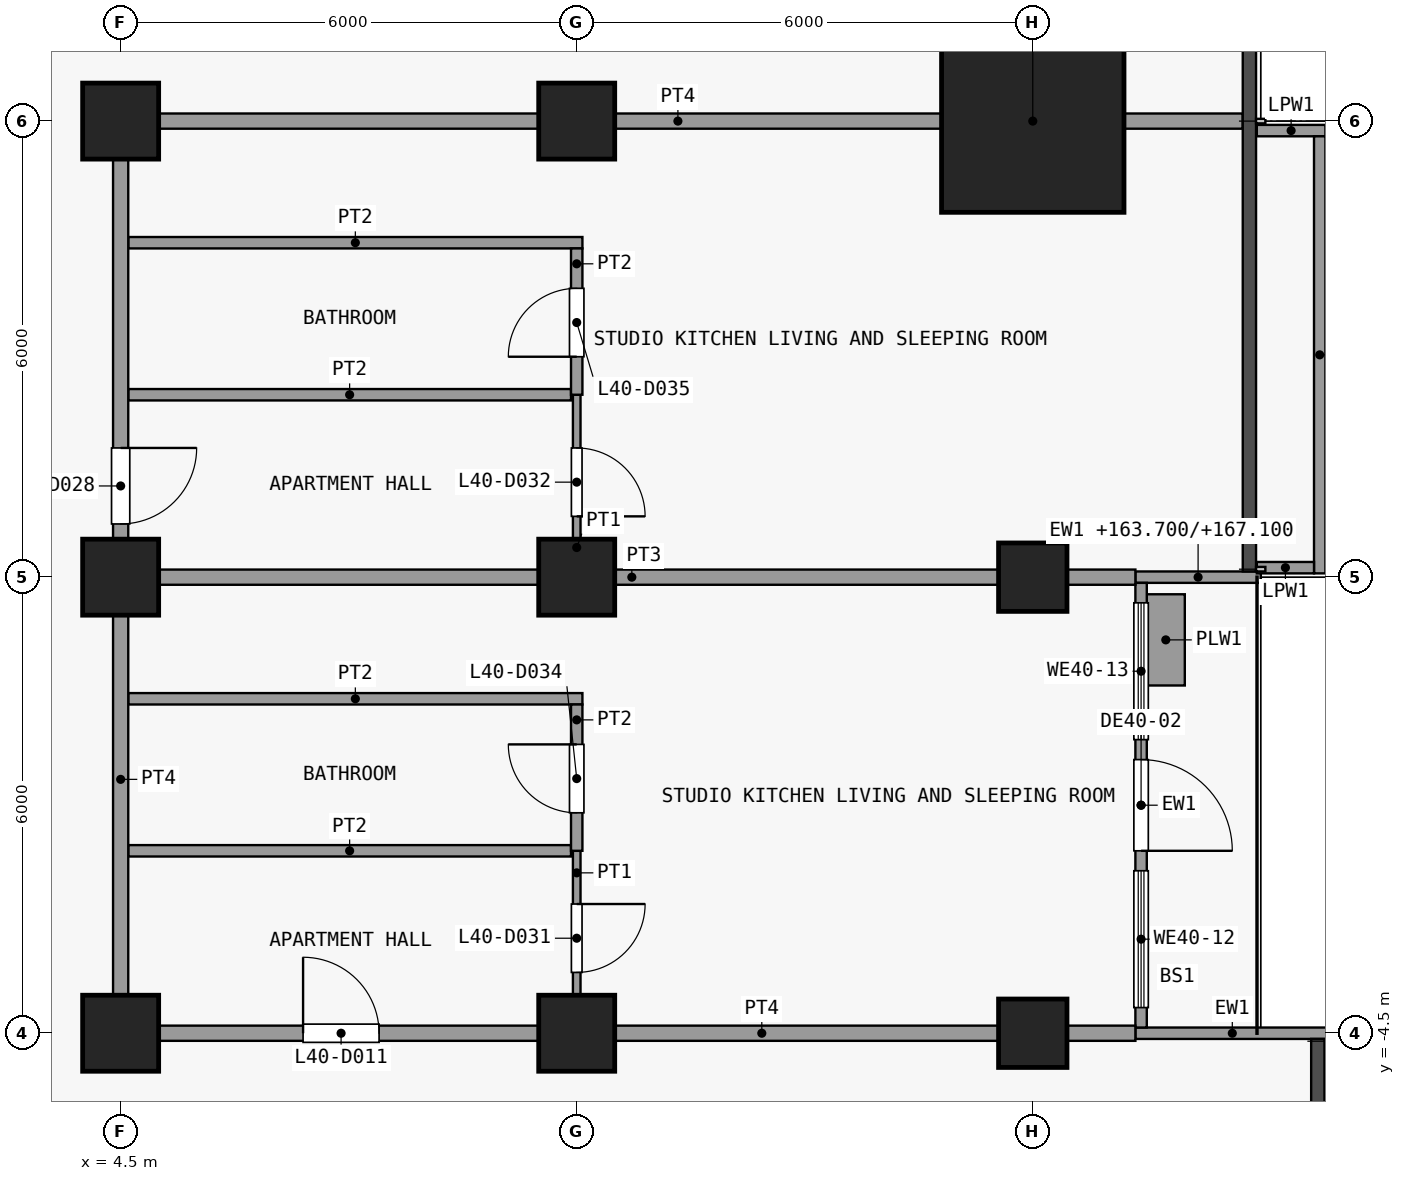
"""IFC4 building model, lengths in metres.
Left out: names, types, materials, properties, quantities, classifications, styles, units other than length and angle.
Written with IfcOpenShell. Run it as: python <this file> out.ifc"""

import sys

from ifc_helpers import new_model, si_unit, direction, frame, frame_2d, origin, origin_2d, place, context, subcontext, project, spatial, rectangle, extrude, element, fill, save


model = new_model("IFC4")
c1 = context("Model", 3, precision=1e-05, world=origin(), true_north=direction((0.0, 1.0)))
c2 = subcontext(c1, "Body", "Model", "MODEL_VIEW")
j1 = project(units=[si_unit("LENGTHUNIT", "METRE"), si_unit("PLANEANGLEUNIT", "RADIAN")], contexts=[c1])
p1 = place(None, origin())
s1 = spatial("IfcSite", under=j1, at=p1, CompositionType="ELEMENT")
p2 = place(p1, origin())
s2 = spatial("IfcBuilding", under=s1, at=p2, CompositionType="ELEMENT")
p3 = place(p2, frame((0.0, 0.0, 163.7)))
s3 = spatial("IfcBuildingStorey", under=s2, at=p3, CompositionType="ELEMENT", Elevation=163.7)
for number, where, z_axis, x_axis in (
    (1, (4.5, -4.5, 0.0), (0.0, 0.0, 1.0), (1.0, 0.0, 0.0)),
    (2, (4.5, 1.5, 0.0), (0.0, 0.0, 1.0), (1.0, 0.0, 0.0)),
    (3, (4.5, 7.5, 0.0), (0.0, 0.0, 1.0), (1.0, 0.0, 0.0)),
    (4, (10.5, -4.5, 0.0), (0.0, 0.0, 1.0), (1.0, 0.0, 0.0)),
    (5, (10.5, 1.5, 0.0), (0.0, 0.0, 1.0), (1.0, 0.0, 0.0)),
    (6, (10.5, 7.5, 0.0), (0.0, 0.0, 1.0), (1.0, 0.0, 0.0)),
):
    element("IfcColumn", number, at=place(p3, frame(where, z_axis=z_axis, x_axis=x_axis)), inside=s3, PredefinedType="COLUMN", context=c2, shape_type="SweptSolid", body=[
        extrude(rectangle(XDim=1.0, YDim=1.0, at=origin_2d()), origin(), (0.0, 0.0, 1.0), 3.6),
    ])
for number, where, z_axis, x_axis in (
    (7, (16.5, -4.5, 0.0), (0.0, 0.0, 1.0), (1.0, 0.0, 0.0)),
    (8, (16.5, 1.5, 0.0), (0.0, 0.0, 1.0), (1.0, 0.0, 0.0)),
):
    element("IfcColumn", number, at=place(p3, frame(where, z_axis=z_axis, x_axis=x_axis)), inside=s3, PredefinedType="COLUMN", context=c2, shape_type="SweptSolid", body=[
        extrude(rectangle(XDim=0.9, YDim=0.9, at=origin_2d()), origin(), (0.0, 0.0, 1.0), 3.6),
    ])
p4 = place(p3, frame((16.5, 7.5, 0.0), z_axis=(0.0, 0.0, 1.0), x_axis=(1.0, 0.0, 0.0)))
e9 = element("IfcColumn", 9, at=p4, inside=s3, PredefinedType="COLUMN", context=c2, shape_type="SweptSolid", body=[
    extrude(rectangle(XDim=2.4, YDim=2.4, at=origin_2d()), origin(), (0.0, 0.0, 1.0), 3.6),
])
p5 = place(p3, frame((17.85, -4.5, 0.0), z_axis=(0.0, 0.0, 1.0), x_axis=(1.0, 0.0, 0.0)))
e10 = element("IfcWall", 10, at=p5, inside=s3, PredefinedType="SOLIDWALL", context=c2, shape_type="SweptSolid", body=[
    extrude(rectangle(XDim=2.55, YDim=0.15, at=frame_2d((1.275, 0.0))), origin(), (0.0, 0.0, 1.0), 3.3),
])
p6 = place(p3, frame((17.85, 1.5, 0.0), z_axis=(0.0, 0.0, 1.0), x_axis=(1.0, 0.0, 0.0)))
e11 = element("IfcWall", 11, at=p6, inside=s3, PredefinedType="SOLIDWALL", context=c2, shape_type="SweptSolid", body=[
    extrude(rectangle(XDim=1.65, YDim=0.15, at=frame_2d((0.825, 0.0))), origin(), (0.0, 0.0, 1.0), 3.4),
])
p7 = place(p3, frame((17.925, 1.425, 0.0), z_axis=(0.0, 0.0, 1.0), x_axis=(0.0, -1.0, 0.0)))
e12 = element("IfcWall", 12, at=p7, inside=s3, PredefinedType="SOLIDWALL", context=c2, shape_type="SweptSolid", body=[
    extrude(rectangle(XDim=5.85, YDim=0.15, at=frame_2d((2.925, 0.0))), origin(), (0.0, 0.0, 1.0), 3.3),
])
p8 = place(p7, frame((2.325, 0.0, 0.0)))
e13 = element("IfcOpeningElement", 13, at=p8, cuts=e12, PredefinedType="OPENING", context=c2, shape_type="SweptSolid", body=[
    extrude(rectangle(XDim=1.2, YDim=2.4, at=frame_2d((0.6, 1.2))), frame((0.0, 0.085, 0.0), z_axis=(0.0, -1.0, 0.0), x_axis=(1.0, 0.0, 0.0)), (0.0, 0.0, 1.0), 0.17),
])
p9 = place(p7, frame((3.788, 0.0, 0.9)))
e14 = element("IfcOpeningElement", 14, at=p9, cuts=e12, PredefinedType="OPENING", context=c2, shape_type="SweptSolid", body=[
    extrude(rectangle(XDim=1.8, YDim=2.1, at=frame_2d((0.9, 1.05))), frame((0.0, 0.085, 0.0), z_axis=(0.0, -1.0, 0.0), x_axis=(1.0, 0.0, 0.0)), (0.0, 0.0, 1.0), 0.17),
])
p10 = place(p7, frame((0.262, 0.0, 0.9)))
e15 = element("IfcOpeningElement", 15, at=p10, cuts=e12, PredefinedType="OPENING", context=c2, shape_type="SweptSolid", body=[
    extrude(rectangle(XDim=1.8, YDim=2.1, at=frame_2d((0.9, 1.05))), frame((0.0, 0.085, 0.0), z_axis=(0.0, -1.0, 0.0), x_axis=(1.0, 0.0, 0.0)), (0.0, 0.0, 1.0), 0.17),
])
p11 = place(p3, frame((18.25, 0.075, 0.0), z_axis=(0.0, 0.0, 1.0), x_axis=(0.0, 1.0, 0.0)))
e16 = element("IfcWall", 16, at=p11, inside=s3, PredefinedType="USERDEFINED", context=c2, shape_type="SweptSolid", body=[
    extrude(rectangle(XDim=1.2, YDim=0.5, at=frame_2d((0.6, 0.0))), origin(), (0.0, 0.0, 1.0), 0.9),
])
p12 = place(p3, frame((19.448, 7.375, 0.0), z_axis=(0.0, 0.0, 1.0), x_axis=(1.0, 0.0, 0.0)))
e17 = element("IfcWall", 17, at=p12, inside=s3, PredefinedType="PARAPET", context=c2, shape_type="SweptSolid", body=[
    extrude(rectangle(XDim=0.903, YDim=0.15, at=frame_2d((0.451, 0.0))), origin(), (0.0, 0.0, 1.0), 1.15),
])
p13 = place(p3, frame((20.275, 7.3, 0.0), z_axis=(0.0, 0.0, 1.0), x_axis=(0.0, -1.0, 0.0)))
e18 = element("IfcWall", 18, at=p13, inside=s3, PredefinedType="PARAPET", context=c2, shape_type="SweptSolid", body=[
    extrude(rectangle(XDim=5.75, YDim=0.15, at=frame_2d((2.875, 0.0))), origin(), (0.0, 0.0, 1.0), 1.15),
])
p14 = place(p3, frame((20.2, 1.625, 0.0), z_axis=(0.0, 0.0, 1.0), x_axis=(-1.0, 0.0, 0.0)))
e19 = element("IfcWall", 19, at=p14, inside=s3, PredefinedType="PARAPET", context=c2, shape_type="SweptSolid", body=[
    extrude(rectangle(XDim=0.752, YDim=0.15, at=frame_2d((0.376, 0.0))), origin(), (0.0, 0.0, 1.0), 1.15),
])
p15 = place(p3, frame((4.4, -4.5, 0.0), z_axis=(0.0, 0.0, 1.0), x_axis=(1.0, 0.0, 0.0)))
e20 = element("IfcWall", 20, at=p15, inside=s3, PredefinedType="PARTITIONING", context=c2, shape_type="SweptSolid", body=[
    extrude(rectangle(XDim=13.45, YDim=0.2, at=frame_2d((6.725, 0.0))), origin(), (0.0, 0.0, 1.0), 3.3),
])
p16 = place(p15, frame((2.5, 0.0, 0.0)))
e21 = element("IfcOpeningElement", 21, at=p16, cuts=e20, PredefinedType="OPENING", context=c2, shape_type="SweptSolid", body=[
    extrude(rectangle(XDim=1.0, YDim=2.1, at=frame_2d((0.5, 1.05))), frame((0.0, 0.11, 0.0), z_axis=(0.0, -1.0, 0.0), x_axis=(1.0, 0.0, 0.0)), (0.0, 0.0, 1.0), 0.22),
])
p17 = place(p3, frame((4.6, -2.1, 0.0), z_axis=(0.0, 0.0, 1.0), x_axis=(1.0, 0.0, 0.0)))
e22 = element("IfcWall", 22, at=p17, inside=s3, PredefinedType="PARTITIONING", context=c2, shape_type="SweptSolid", body=[
    extrude(rectangle(XDim=5.825, YDim=0.15, at=frame_2d((2.913, 0.0))), origin(), (0.0, 0.0, 1.0), 3.3),
])
p18 = place(p3, frame((4.6, -0.1, 0.0), z_axis=(0.0, 0.0, 1.0), x_axis=(1.0, 0.0, 0.0)))
e23 = element("IfcWall", 23, at=p18, inside=s3, PredefinedType="PARTITIONING", context=c2, shape_type="SweptSolid", body=[
    extrude(rectangle(XDim=5.975, YDim=0.15, at=frame_2d((2.987, 0.0))), origin(), (0.0, 0.0, 1.0), 3.3),
])
p19 = place(p3, frame((4.6, 1.5, 0.0), z_axis=(0.0, 0.0, 1.0), x_axis=(1.0, 0.0, 0.0)))
e24 = element("IfcWall", 24, at=p19, inside=s3, PredefinedType="PARTITIONING", context=c2, shape_type="SweptSolid", body=[
    extrude(rectangle(XDim=13.25, YDim=0.2, at=frame_2d((6.625, 0.0))), origin(), (0.0, 0.0, 1.0), 3.3),
])
p20 = place(p3, frame((4.6, 3.9, 0.0), z_axis=(0.0, 0.0, 1.0), x_axis=(1.0, 0.0, 0.0)))
e25 = element("IfcWall", 25, at=p20, inside=s3, PredefinedType="PARTITIONING", context=c2, shape_type="SweptSolid", body=[
    extrude(rectangle(XDim=5.825, YDim=0.15, at=frame_2d((2.913, 0.0))), origin(), (0.0, 0.0, 1.0), 3.3),
])
p21 = place(p3, frame((4.6, 5.9, 0.0), z_axis=(0.0, 0.0, 1.0), x_axis=(1.0, 0.0, 0.0)))
e26 = element("IfcWall", 26, at=p21, inside=s3, PredefinedType="PARTITIONING", context=c2, shape_type="SweptSolid", body=[
    extrude(rectangle(XDim=5.975, YDim=0.15, at=frame_2d((2.987, 0.0))), origin(), (0.0, 0.0, 1.0), 3.3),
])
p22 = place(p3, frame((4.4, 7.5, 0.0), z_axis=(0.0, 0.0, 1.0), x_axis=(1.0, 0.0, 0.0)))
e27 = element("IfcWall", 27, at=p22, inside=s3, PredefinedType="PARTITIONING", context=c2, shape_type="SweptSolid", body=[
    extrude(rectangle(XDim=14.863, YDim=0.2, at=frame_2d((7.431, 0.0))), origin(), (0.0, 0.0, 1.0), 3.3),
])
p23 = place(p3, frame((4.5, -4.4, 0.0), z_axis=(0.0, 0.0, 1.0), x_axis=(0.0, 1.0, 0.0)))
e28 = element("IfcWall", 28, at=p23, inside=s3, PredefinedType="PARTITIONING", context=c2, shape_type="SweptSolid", body=[
    extrude(rectangle(XDim=11.8, YDim=0.2, at=frame_2d((5.9, 0.0))), origin(), (0.0, 0.0, 1.0), 3.3),
])
p24 = place(p23, frame((6.6, 0.0, 0.0)))
e29 = element("IfcOpeningElement", 29, at=p24, cuts=e28, PredefinedType="OPENING", context=c2, shape_type="SweptSolid", body=[
    extrude(rectangle(XDim=1.0, YDim=2.1, at=frame_2d((0.5, 1.05))), frame((0.0, 0.11, 0.0), z_axis=(0.0, -1.0, 0.0), x_axis=(1.0, 0.0, 0.0)), (0.0, 0.0, 1.0), 0.22),
])
p25 = place(p3, frame((10.5, -4.4, 0.0), z_axis=(0.0, 0.0, 1.0), x_axis=(0.0, 1.0, 0.0)))
e30 = element("IfcWall", 30, at=p25, inside=s3, PredefinedType="PARTITIONING", context=c2, shape_type="SweptSolid", body=[
    extrude(rectangle(XDim=2.3, YDim=0.1, at=frame_2d((1.15, 0.0))), origin(), (0.0, 0.0, 1.0), 3.3),
])
p26 = place(p25, frame((0.7, 0.0, 0.0)))
e31 = element("IfcOpeningElement", 31, at=p26, cuts=e30, PredefinedType="OPENING", context=c2, shape_type="SweptSolid", body=[
    extrude(rectangle(XDim=0.9, YDim=2.1, at=frame_2d((0.45, 1.05))), frame((0.0, 0.06, 0.0), z_axis=(0.0, -1.0, 0.0), x_axis=(1.0, 0.0, 0.0)), (0.0, 0.0, 1.0), 0.12),
])
p27 = place(p3, frame((10.5, 1.6, 0.0), z_axis=(0.0, 0.0, 1.0), x_axis=(0.0, 1.0, 0.0)))
e32 = element("IfcWall", 32, at=p27, inside=s3, PredefinedType="PARTITIONING", context=c2, shape_type="SweptSolid", body=[
    extrude(rectangle(XDim=2.3, YDim=0.1, at=frame_2d((1.15, 0.0))), origin(), (0.0, 0.0, 1.0), 3.3),
])
p28 = place(p27, frame((0.7, 0.0, 0.0)))
e33 = element("IfcOpeningElement", 33, at=p28, cuts=e32, PredefinedType="OPENING", context=c2, shape_type="SweptSolid", body=[
    extrude(rectangle(XDim=0.9, YDim=2.1, at=frame_2d((0.45, 1.05))), frame((0.0, 0.06, 0.0), z_axis=(0.0, -1.0, 0.0), x_axis=(1.0, 0.0, 0.0)), (0.0, 0.0, 1.0), 0.12),
])
p29 = place(p3, frame((10.5, -2.1, 0.0), z_axis=(0.0, 0.0, 1.0), x_axis=(0.0, 1.0, 0.0)))
e34 = element("IfcWall", 34, at=p29, inside=s3, PredefinedType="PARTITIONING", context=c2, shape_type="SweptSolid", body=[
    extrude(rectangle(XDim=1.925, YDim=0.15, at=frame_2d((0.962, 0.0))), origin(), (0.0, 0.0, 1.0), 3.3),
])
p30 = place(p29, frame((0.5, 0.0, 0.0)))
e35 = element("IfcOpeningElement", 35, at=p30, cuts=e34, PredefinedType="OPENING", context=c2, shape_type="SweptSolid", body=[
    extrude(rectangle(XDim=0.9, YDim=2.1, at=frame_2d((0.45, 1.05))), frame((0.0, 0.085, 0.0), z_axis=(0.0, -1.0, 0.0), x_axis=(1.0, 0.0, 0.0)), (0.0, 0.0, 1.0), 0.17),
])
p31 = place(p3, frame((10.5, 3.9, 0.0), z_axis=(0.0, 0.0, 1.0), x_axis=(0.0, 1.0, 0.0)))
e36 = element("IfcWall", 36, at=p31, inside=s3, PredefinedType="PARTITIONING", context=c2, shape_type="SweptSolid", body=[
    extrude(rectangle(XDim=1.925, YDim=0.15, at=frame_2d((0.962, 0.0))), origin(), (0.0, 0.0, 1.0), 3.3),
])
p32 = place(p31, frame((0.5, 0.0, 0.0)))
e37 = element("IfcOpeningElement", 37, at=p32, cuts=e36, PredefinedType="OPENING", context=c2, shape_type="SweptSolid", body=[
    extrude(rectangle(XDim=0.9, YDim=2.1, at=frame_2d((0.45, 1.05))), frame((0.0, 0.085, 0.0), z_axis=(0.0, -1.0, 0.0), x_axis=(1.0, 0.0, 0.0)), (0.0, 0.0, 1.0), 0.17),
])
p33 = place(p8, origin())
e38 = element("IfcDoor", 38, at=p33, inside=s3, OperationType="SINGLE_SWING_RIGHT", PredefinedType="DOOR", context=c2, shape_type="SweptSolid", body=[
    extrude(rectangle(XDim=1.2, YDim=2.4, at=frame_2d((0.6, 1.2))), frame((0.0, 0.025, 0.0), z_axis=(0.0, -1.0, 0.0), x_axis=(1.0, 0.0, 0.0)), (0.0, 0.0, 1.0), 0.05),
])
fill(e13, e38)
p34 = place(p9, origin())
e39 = element("IfcWindow", 39, at=p34, inside=s3, PartitioningType="SINGLE_PANEL", PredefinedType="WINDOW", context=c2, shape_type="SweptSolid", body=[
    extrude(rectangle(XDim=1.8, YDim=2.1, at=frame_2d((0.9, 1.05))), frame((0.0, 0.03, 0.0), z_axis=(0.0, -1.0, 0.0), x_axis=(1.0, 0.0, 0.0)), (0.0, 0.0, 1.0), 0.06),
])
fill(e14, e39)
p35 = place(p10, origin())
e40 = element("IfcWindow", 40, at=p35, inside=s3, PartitioningType="SINGLE_PANEL", PredefinedType="WINDOW", context=c2, shape_type="SweptSolid", body=[
    extrude(rectangle(XDim=1.8, YDim=2.1, at=frame_2d((0.9, 1.05))), frame((0.0, 0.03, 0.0), z_axis=(0.0, -1.0, 0.0), x_axis=(1.0, 0.0, 0.0)), (0.0, 0.0, 1.0), 0.06),
])
fill(e15, e40)
p36 = place(p16, origin())
e41 = element("IfcDoor", 41, at=p36, inside=s3, OperationType="SINGLE_SWING_RIGHT", PredefinedType="DOOR", context=c2, shape_type="SweptSolid", body=[
    extrude(rectangle(XDim=1.0, YDim=2.1, at=frame_2d((0.5, 1.05))), frame((0.0, 0.025, 0.0), z_axis=(0.0, -1.0, 0.0), x_axis=(1.0, 0.0, 0.0)), (0.0, 0.0, 1.0), 0.05),
])
fill(e21, e41)
p37 = place(p24, origin())
e42 = element("IfcDoor", 42, at=p37, inside=s3, OperationType="SINGLE_SWING_RIGHT", PredefinedType="DOOR", context=c2, shape_type="SweptSolid", body=[
    extrude(rectangle(XDim=1.0, YDim=2.1, at=frame_2d((0.5, 1.05))), frame((0.0, 0.025, 0.0), z_axis=(0.0, -1.0, 0.0), x_axis=(1.0, 0.0, 0.0)), (0.0, 0.0, 1.0), 0.05),
])
fill(e29, e42)
p38 = place(p26, origin())
e43 = element("IfcDoor", 43, at=p38, inside=s3, OperationType="SINGLE_SWING_RIGHT", PredefinedType="DOOR", context=c2, shape_type="SweptSolid", body=[
    extrude(rectangle(XDim=0.9, YDim=2.1, at=frame_2d((0.45, 1.05))), frame((0.0, 0.025, 0.0), z_axis=(0.0, -1.0, 0.0), x_axis=(1.0, 0.0, 0.0)), (0.0, 0.0, 1.0), 0.05),
])
fill(e31, e43)
p39 = place(p28, origin())
e44 = element("IfcDoor", 44, at=p39, inside=s3, OperationType="SINGLE_SWING_LEFT", PredefinedType="DOOR", context=c2, shape_type="SweptSolid", body=[
    extrude(rectangle(XDim=0.9, YDim=2.1, at=frame_2d((0.45, 1.05))), frame((0.0, 0.025, 0.0), z_axis=(0.0, -1.0, 0.0), x_axis=(1.0, 0.0, 0.0)), (0.0, 0.0, 1.0), 0.05),
])
fill(e33, e44)
p40 = place(p30, origin())
e45 = element("IfcDoor", 45, at=p40, inside=s3, OperationType="SINGLE_SWING_LEFT", PredefinedType="DOOR", context=c2, shape_type="SweptSolid", body=[
    extrude(rectangle(XDim=0.9, YDim=2.1, at=frame_2d((0.45, 1.05))), frame((0.0, 0.025, 0.0), z_axis=(0.0, -1.0, 0.0), x_axis=(1.0, 0.0, 0.0)), (0.0, 0.0, 1.0), 0.05),
])
fill(e35, e45)
p41 = place(p32, origin())
e46 = element("IfcDoor", 46, at=p41, inside=s3, OperationType="SINGLE_SWING_RIGHT", PredefinedType="DOOR", context=c2, shape_type="SweptSolid", body=[
    extrude(rectangle(XDim=0.9, YDim=2.1, at=frame_2d((0.45, 1.05))), frame((0.0, 0.025, 0.0), z_axis=(0.0, -1.0, 0.0), x_axis=(1.0, 0.0, 0.0)), (0.0, 0.0, 1.0), 0.05),
])
fill(e37, e46)
save(model, sys.argv[1])
